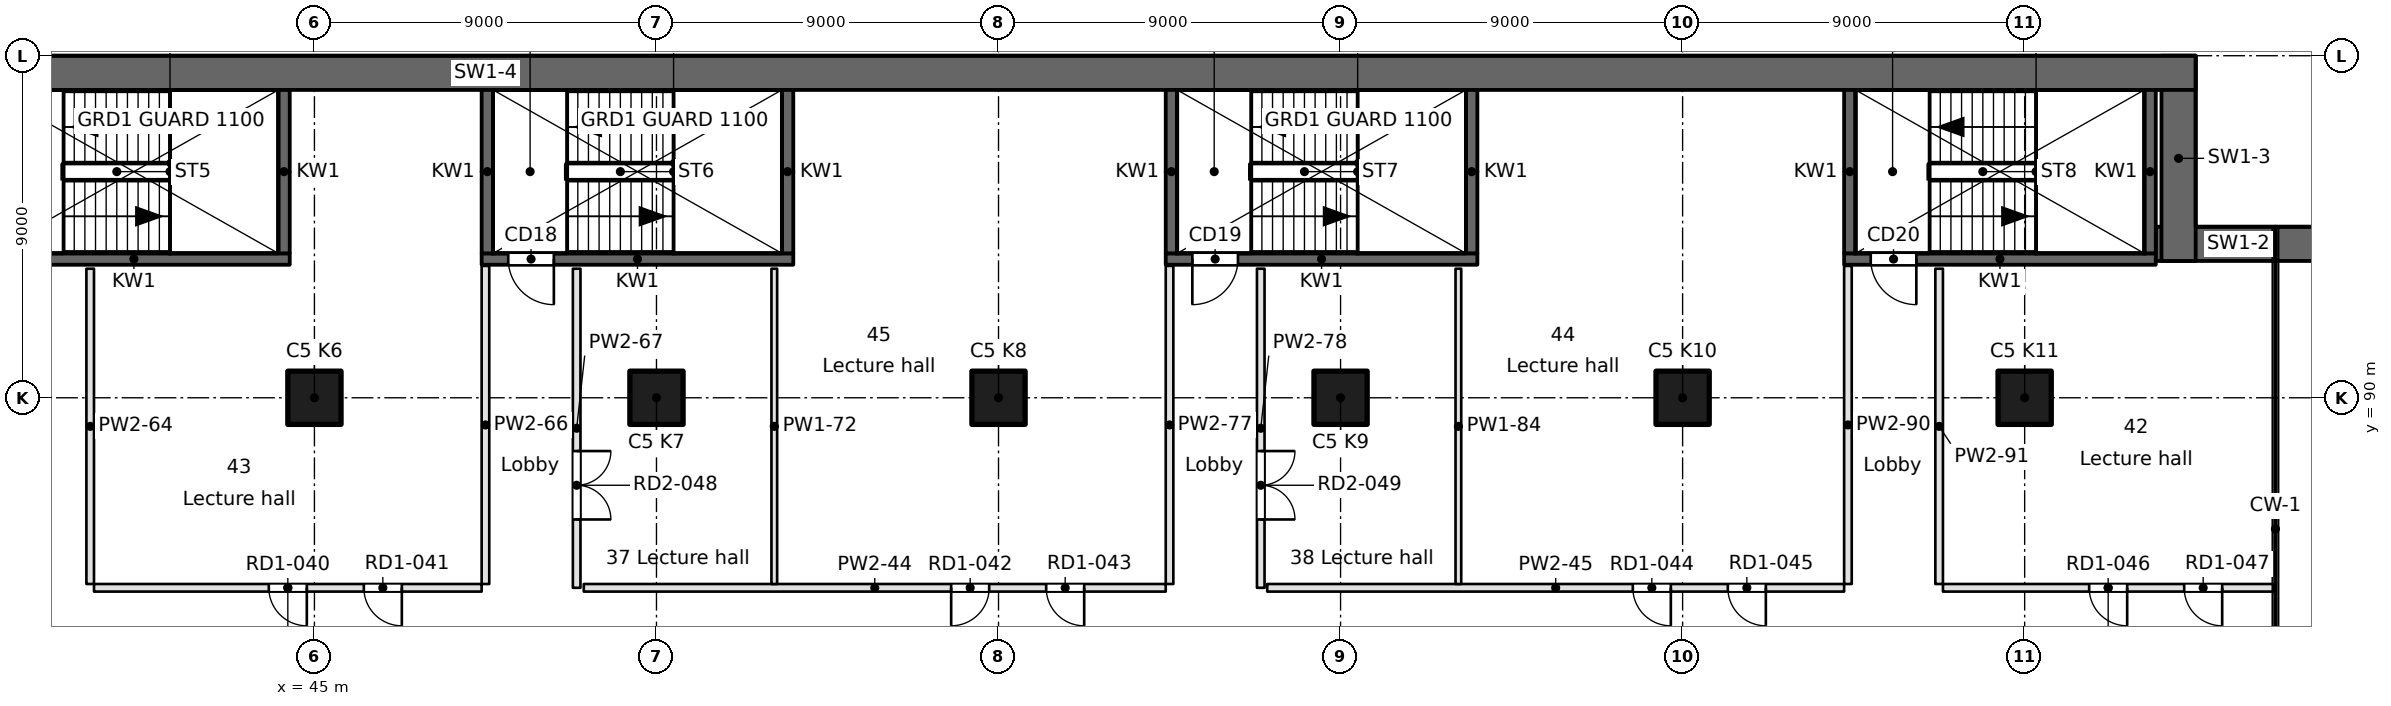
"""IFC4 building model, lengths in metres.
Left out: names, types, materials, properties, quantities, classifications, styles, units other than length and angle.
Written with IfcOpenShell. Run it as: python <this file> out.ifc"""

import sys

from ifc_helpers import new_model, si_unit, direction, frame, frame_2d, origin, origin_2d, place, context, subcontext, project, spatial, rectangle, extrude, element, fill, save


model = new_model("IFC4")
c1 = context("Model", 3, precision=1e-05, world=origin(), true_north=direction((0.0, 1.0)))
c2 = subcontext(c1, "Body", "Model", "MODEL_VIEW")
j1 = project(units=[si_unit("LENGTHUNIT", "METRE"), si_unit("PLANEANGLEUNIT", "RADIAN")], contexts=[c1])
p1 = place(None, origin())
s1 = spatial("IfcSite", under=j1, at=p1, CompositionType="ELEMENT")
p2 = place(p1, origin())
s2 = spatial("IfcBuilding", under=s1, at=p2, CompositionType="ELEMENT")
p3 = place(p2, frame((0.0, 0.0, 58.0)))
s3 = spatial("IfcBuildingStorey", under=s2, at=p3, CompositionType="ELEMENT", Elevation=58.0)
for number, where, z_axis, x_axis in (
    (1, (45.0, 90.0, 0.0), (0.0, 0.0, 1.0), (1.0, 0.0, 0.0)),
    (2, (54.0, 90.0, 0.0), (0.0, 0.0, 1.0), (1.0, 0.0, 0.0)),
    (3, (63.0, 90.0, 0.0), (0.0, 0.0, 1.0), (1.0, 0.0, 0.0)),
    (4, (72.0, 90.0, 0.0), (0.0, 0.0, 1.0), (1.0, 0.0, 0.0)),
    (5, (81.0, 90.0, 0.0), (0.0, 0.0, 1.0), (1.0, 0.0, 0.0)),
    (6, (90.0, 90.0, 0.0), (0.0, 0.0, 1.0), (1.0, 0.0, 0.0)),
):
    element("IfcColumn", number, at=place(p3, frame(where, z_axis=z_axis, x_axis=x_axis)), inside=s3, PredefinedType="COLUMN", context=c2, shape_type="SweptSolid", body=[
        extrude(rectangle(XDim=1.4, YDim=1.4, at=origin_2d()), origin(), (0.0, 0.0, 1.0), 3.7),
    ])
p4 = place(p3, frame((97.8, 94.05, 0.0), z_axis=(0.0, 0.0, 1.0), x_axis=(-1.0, 0.0, 0.0)))
e7 = element("IfcWall", 7, at=p4, inside=s3, PredefinedType="SHEAR", context=c2, shape_type="SweptSolid", body=[
    extrude(rectangle(XDim=4.351, YDim=0.9, at=frame_2d((2.175, 0.0))), origin(), (0.0, 0.0, 1.0), 3.7),
])
p5 = place(p3, frame((94.05, 93.6, 0.0), z_axis=(0.0, 0.0, 1.0), x_axis=(0.0, 1.0, 0.0)))
e8 = element("IfcWall", 8, at=p5, inside=s3, PredefinedType="SHEAR", context=c2, shape_type="SweptSolid", body=[
    extrude(rectangle(XDim=5.4, YDim=0.9, at=frame_2d((2.7, 0.0))), origin(), (0.0, 0.0, 1.0), 3.7),
])
p6 = place(p3, frame((94.5, 98.55, 0.0), z_axis=(0.0, 0.0, 1.0), x_axis=(-1.0, 0.0, 0.0)))
e9 = element("IfcWall", 9, at=p6, inside=s3, PredefinedType="SHEAR", context=c2, shape_type="SweptSolid", body=[
    extrude(rectangle(XDim=90.0, YDim=0.9, at=frame_2d((45.0, 0.0))), origin(), (0.0, 0.0, 1.0), 3.7),
])
p7 = place(p3, frame((36.15, 93.65, -0.4), z_axis=(0.0, 0.0, 1.0), x_axis=(1.0, 0.0, 0.0)))
e10 = element("IfcWall", 10, at=p7, inside=s3, PredefinedType="SOLIDWALL", context=c2, shape_type="SweptSolid", body=[
    extrude(rectangle(XDim=8.2, YDim=0.3, at=frame_2d((4.1, 0.0))), origin(), (0.0, 0.0, 1.0), 3.7),
])
p8 = place(p7, frame((0.7, 0.0, 0.4)))
e11 = element("IfcOpeningElement", 11, at=p8, cuts=e10, PredefinedType="OPENING", context=c2, shape_type="SweptSolid", body=[
    extrude(rectangle(XDim=1.2, YDim=2.1, at=frame_2d((0.6, 1.05))), frame((0.0, 0.15, 0.0), z_axis=(0.0, -1.0, 0.0), x_axis=(1.0, 0.0, 0.0)), (0.0, 0.0, 1.0), 0.3),
])
p9 = place(p3, frame((49.4, 93.65, -0.4), z_axis=(0.0, 0.0, 1.0), x_axis=(1.0, 0.0, 0.0)))
e12 = element("IfcWall", 12, at=p9, inside=s3, PredefinedType="SOLIDWALL", context=c2, shape_type="SweptSolid", body=[
    extrude(rectangle(XDim=8.2, YDim=0.3, at=frame_2d((4.1, 0.0))), origin(), (0.0, 0.0, 1.0), 3.7),
])
p10 = place(p9, frame((0.7, 0.0, 0.4)))
e13 = element("IfcOpeningElement", 13, at=p10, cuts=e12, PredefinedType="OPENING", context=c2, shape_type="SweptSolid", body=[
    extrude(rectangle(XDim=1.2, YDim=2.1, at=frame_2d((0.6, 1.05))), frame((0.0, 0.15, 0.0), z_axis=(0.0, -1.0, 0.0), x_axis=(1.0, 0.0, 0.0)), (0.0, 0.0, 1.0), 0.3),
])
p11 = place(p3, frame((67.4, 93.65, -0.4), z_axis=(0.0, 0.0, 1.0), x_axis=(1.0, 0.0, 0.0)))
e14 = element("IfcWall", 14, at=p11, inside=s3, PredefinedType="SOLIDWALL", context=c2, shape_type="SweptSolid", body=[
    extrude(rectangle(XDim=8.2, YDim=0.3, at=frame_2d((4.1, 0.0))), origin(), (0.0, 0.0, 1.0), 3.7),
])
p12 = place(p11, frame((0.7, 0.0, 0.4)))
e15 = element("IfcOpeningElement", 15, at=p12, cuts=e14, PredefinedType="OPENING", context=c2, shape_type="SweptSolid", body=[
    extrude(rectangle(XDim=1.2, YDim=2.1, at=frame_2d((0.6, 1.05))), frame((0.0, 0.15, 0.0), z_axis=(0.0, -1.0, 0.0), x_axis=(1.0, 0.0, 0.0)), (0.0, 0.0, 1.0), 0.3),
])
p13 = place(p3, frame((85.25, 93.65, -0.4), z_axis=(0.0, 0.0, 1.0), x_axis=(1.0, 0.0, 0.0)))
e16 = element("IfcWall", 16, at=p13, inside=s3, PredefinedType="SOLIDWALL", context=c2, shape_type="SweptSolid", body=[
    extrude(rectangle(XDim=8.2, YDim=0.3, at=frame_2d((4.1, 0.0))), origin(), (0.0, 0.0, 1.0), 3.7),
])
p14 = place(p13, frame((0.7, 0.0, 0.4)))
e17 = element("IfcOpeningElement", 17, at=p14, cuts=e16, PredefinedType="OPENING", context=c2, shape_type="SweptSolid", body=[
    extrude(rectangle(XDim=1.2, YDim=2.1, at=frame_2d((0.6, 1.05))), frame((0.0, 0.15, 0.0), z_axis=(0.0, -1.0, 0.0), x_axis=(1.0, 0.0, 0.0)), (0.0, 0.0, 1.0), 0.3),
])
for number, where, z_axis, x_axis in (
    (18, (44.2, 93.8, -0.4), (0.0, 0.0, 1.0), (0.0, 1.0, 0.0)),
    (19, (49.55, 93.8, -0.4), (0.0, 0.0, 1.0), (0.0, 1.0, 0.0)),
    (20, (57.45, 93.8, -0.4), (0.0, 0.0, 1.0), (0.0, 1.0, 0.0)),
    (21, (67.55, 93.8, -0.4), (0.0, 0.0, 1.0), (0.0, 1.0, 0.0)),
    (22, (75.45, 93.8, -0.4), (0.0, 0.0, 1.0), (0.0, 1.0, 0.0)),
    (23, (85.4, 93.8, -0.4), (0.0, 0.0, 1.0), (0.0, 1.0, 0.0)),
    (24, (93.3, 93.8, -0.4), (0.0, 0.0, 1.0), (0.0, 1.0, 0.0)),
):
    element("IfcWall", number, at=place(p3, frame(where, z_axis=z_axis, x_axis=x_axis)), inside=s3, PredefinedType="SOLIDWALL", context=c2, shape_type="SweptSolid", body=[
        extrude(rectangle(XDim=4.3, YDim=0.3, at=frame_2d((2.15, 0.0))), origin(), (0.0, 0.0, 1.0), 3.7),
    ])
p15 = place(p3, frame((39.2, 85.0, 0.0), z_axis=(0.0, 0.0, 1.0), x_axis=(1.0, 0.0, 0.0)))
e25 = element("IfcWall", 25, at=p15, inside=s3, PredefinedType="PARTITIONING", context=c2, shape_type="SweptSolid", body=[
    extrude(rectangle(XDim=10.2, YDim=0.2, at=frame_2d((5.1, 0.0))), origin(), (0.0, 0.0, 1.0), 3.3),
])
p16 = place(p15, frame((4.6, 0.0, 0.0)))
e26 = element("IfcOpeningElement", 26, at=p16, cuts=e25, PredefinedType="OPENING", context=c2, shape_type="SweptSolid", body=[
    extrude(rectangle(XDim=1.0, YDim=2.1, at=frame_2d((0.5, 1.05))), frame((0.0, 0.1, 0.0), z_axis=(0.0, -1.0, 0.0), x_axis=(1.0, 0.0, 0.0)), (0.0, 0.0, 1.0), 0.2),
])
p17 = place(p15, frame((7.1, 0.0, 0.0)))
e27 = element("IfcOpeningElement", 27, at=p17, cuts=e25, PredefinedType="OPENING", context=c2, shape_type="SweptSolid", body=[
    extrude(rectangle(XDim=1.0, YDim=2.1, at=frame_2d((0.5, 1.05))), frame((0.0, 0.1, 0.0), z_axis=(0.0, -1.0, 0.0), x_axis=(1.0, 0.0, 0.0)), (0.0, 0.0, 1.0), 0.2),
])
p18 = place(p3, frame((52.088, 85.0, 0.0), z_axis=(0.0, 0.0, 1.0), x_axis=(1.0, 0.0, 0.0)))
e28 = element("IfcWall", 28, at=p18, inside=s3, PredefinedType="PARTITIONING", context=c2, shape_type="SweptSolid", body=[
    extrude(rectangle(XDim=15.312, YDim=0.2, at=frame_2d((7.656, 0.0))), origin(), (0.0, 0.0, 1.0), 3.3),
])
p19 = place(p18, frame((9.667, 0.0, 0.0)))
e29 = element("IfcOpeningElement", 29, at=p19, cuts=e28, PredefinedType="OPENING", context=c2, shape_type="SweptSolid", body=[
    extrude(rectangle(XDim=1.0, YDim=2.1, at=frame_2d((0.5, 1.05))), frame((0.0, 0.1, 0.0), z_axis=(0.0, -1.0, 0.0), x_axis=(1.0, 0.0, 0.0)), (0.0, 0.0, 1.0), 0.2),
])
p20 = place(p18, frame((12.167, 0.0, 0.0)))
e30 = element("IfcOpeningElement", 30, at=p20, cuts=e28, PredefinedType="OPENING", context=c2, shape_type="SweptSolid", body=[
    extrude(rectangle(XDim=1.0, YDim=2.1, at=frame_2d((0.5, 1.05))), frame((0.0, 0.1, 0.0), z_axis=(0.0, -1.0, 0.0), x_axis=(1.0, 0.0, 0.0)), (0.0, 0.0, 1.0), 0.2),
])
p21 = place(p3, frame((70.07, 85.0, 0.0), z_axis=(0.0, 0.0, 1.0), x_axis=(1.0, 0.0, 0.0)))
e31 = element("IfcWall", 31, at=p21, inside=s3, PredefinedType="PARTITIONING", context=c2, shape_type="SweptSolid", body=[
    extrude(rectangle(XDim=15.18, YDim=0.2, at=frame_2d((7.59, 0.0))), origin(), (0.0, 0.0, 1.0), 3.3),
])
p22 = place(p21, frame((9.62, 0.0, 0.0)))
e32 = element("IfcOpeningElement", 32, at=p22, cuts=e31, PredefinedType="OPENING", context=c2, shape_type="SweptSolid", body=[
    extrude(rectangle(XDim=1.0, YDim=2.1, at=frame_2d((0.5, 1.05))), frame((0.0, 0.1, 0.0), z_axis=(0.0, -1.0, 0.0), x_axis=(1.0, 0.0, 0.0)), (0.0, 0.0, 1.0), 0.2),
])
p23 = place(p21, frame((12.12, 0.0, 0.0)))
e33 = element("IfcOpeningElement", 33, at=p23, cuts=e31, PredefinedType="OPENING", context=c2, shape_type="SweptSolid", body=[
    extrude(rectangle(XDim=1.0, YDim=2.1, at=frame_2d((0.5, 1.05))), frame((0.0, 0.1, 0.0), z_axis=(0.0, -1.0, 0.0), x_axis=(1.0, 0.0, 0.0)), (0.0, 0.0, 1.0), 0.2),
])
p24 = place(p3, frame((87.85, 85.0, 0.0), z_axis=(0.0, 0.0, 1.0), x_axis=(1.0, 0.0, 0.0)))
e34 = element("IfcWall", 34, at=p24, inside=s3, PredefinedType="PARTITIONING", context=c2, shape_type="SweptSolid", body=[
    extrude(rectangle(XDim=8.695, YDim=0.2, at=frame_2d((4.347, 0.0))), origin(), (0.0, 0.0, 1.0), 3.3),
])
p25 = place(p24, frame((3.847, 0.0, 0.0)))
e35 = element("IfcOpeningElement", 35, at=p25, cuts=e34, PredefinedType="OPENING", context=c2, shape_type="SweptSolid", body=[
    extrude(rectangle(XDim=1.0, YDim=2.1, at=frame_2d((0.5, 1.05))), frame((0.0, 0.1, 0.0), z_axis=(0.0, -1.0, 0.0), x_axis=(1.0, 0.0, 0.0)), (0.0, 0.0, 1.0), 0.2),
])
p26 = place(p24, frame((6.347, 0.0, 0.0)))
e36 = element("IfcOpeningElement", 36, at=p26, cuts=e34, PredefinedType="OPENING", context=c2, shape_type="SweptSolid", body=[
    extrude(rectangle(XDim=1.0, YDim=2.1, at=frame_2d((0.5, 1.05))), frame((0.0, 0.1, 0.0), z_axis=(0.0, -1.0, 0.0), x_axis=(1.0, 0.0, 0.0)), (0.0, 0.0, 1.0), 0.2),
])
p27 = place(p3, frame((39.1, 93.396, 0.0), z_axis=(0.0, 0.0, 1.0), x_axis=(0.0, -1.0, 0.0)))
e37 = element("IfcWall", 37, at=p27, inside=s3, PredefinedType="PARTITIONING", context=c2, shape_type="SweptSolid", body=[
    extrude(rectangle(XDim=8.296, YDim=0.2, at=frame_2d((4.148, 0.0))), origin(), (0.0, 0.0, 1.0), 3.3),
])
p28 = place(p3, frame((49.5, 85.1, 0.0), z_axis=(0.0, 0.0, 1.0), x_axis=(0.0, 1.0, 0.0)))
e38 = element("IfcWall", 38, at=p28, inside=s3, PredefinedType="PARTITIONING", context=c2, shape_type="SweptSolid", body=[
    extrude(rectangle(XDim=8.37, YDim=0.2, at=frame_2d((4.185, 0.0))), origin(), (0.0, 0.0, 1.0), 3.3),
])
p29 = place(p3, frame((51.9, 93.396, 0.0), z_axis=(0.0, 0.0, 1.0), x_axis=(0.0, -1.0, 0.0)))
e39 = element("IfcWall", 39, at=p29, inside=s3, PredefinedType="PARTITIONING", context=c2, shape_type="SweptSolid", body=[
    extrude(rectangle(XDim=8.396, YDim=0.2, at=frame_2d((4.198, 0.0))), origin(), (0.0, 0.0, 1.0), 3.3),
])
p30 = place(p29, frame((4.798, 0.0, 0.0)))
e40 = element("IfcOpeningElement", 40, at=p30, cuts=e39, PredefinedType="OPENING", context=c2, shape_type="SweptSolid", body=[
    extrude(rectangle(XDim=1.8, YDim=2.1, at=frame_2d((0.9, 1.05))), frame((0.0, 0.1, 0.0), z_axis=(0.0, -1.0, 0.0), x_axis=(1.0, 0.0, 0.0)), (0.0, 0.0, 1.0), 0.2),
])
p31 = place(p3, frame((57.1, 93.396, 0.0), z_axis=(0.0, 0.0, 1.0), x_axis=(0.0, -1.0, 0.0)))
e41 = element("IfcWall", 41, at=p31, inside=s3, PredefinedType="PARTITIONING", context=c2, shape_type="SweptSolid", body=[
    extrude(rectangle(XDim=8.296, YDim=0.15, at=frame_2d((4.148, 0.0))), origin(), (0.0, 0.0, 1.0), 3.3),
])
p32 = place(p3, frame((67.5, 85.1, 0.0), z_axis=(0.0, 0.0, 1.0), x_axis=(0.0, 1.0, 0.0)))
e42 = element("IfcWall", 42, at=p32, inside=s3, PredefinedType="PARTITIONING", context=c2, shape_type="SweptSolid", body=[
    extrude(rectangle(XDim=8.37, YDim=0.2, at=frame_2d((4.185, 0.0))), origin(), (0.0, 0.0, 1.0), 3.3),
])
p33 = place(p3, frame((69.9, 93.396, 0.0), z_axis=(0.0, 0.0, 1.0), x_axis=(0.0, -1.0, 0.0)))
e43 = element("IfcWall", 43, at=p33, inside=s3, PredefinedType="PARTITIONING", context=c2, shape_type="SweptSolid", body=[
    extrude(rectangle(XDim=8.396, YDim=0.2, at=frame_2d((4.198, 0.0))), origin(), (0.0, 0.0, 1.0), 3.3),
])
p34 = place(p33, frame((4.798, 0.0, 0.0)))
e44 = element("IfcOpeningElement", 44, at=p34, cuts=e43, PredefinedType="OPENING", context=c2, shape_type="SweptSolid", body=[
    extrude(rectangle(XDim=1.8, YDim=2.1, at=frame_2d((0.9, 1.05))), frame((0.0, 0.1, 0.0), z_axis=(0.0, -1.0, 0.0), x_axis=(1.0, 0.0, 0.0)), (0.0, 0.0, 1.0), 0.2),
])
p35 = place(p3, frame((75.1, 93.396, 0.0), z_axis=(0.0, 0.0, 1.0), x_axis=(0.0, -1.0, 0.0)))
e45 = element("IfcWall", 45, at=p35, inside=s3, PredefinedType="PARTITIONING", context=c2, shape_type="SweptSolid", body=[
    extrude(rectangle(XDim=8.296, YDim=0.15, at=frame_2d((4.148, 0.0))), origin(), (0.0, 0.0, 1.0), 3.3),
])
p36 = place(p3, frame((85.35, 85.1, 0.0), z_axis=(0.0, 0.0, 1.0), x_axis=(0.0, 1.0, 0.0)))
e46 = element("IfcWall", 46, at=p36, inside=s3, PredefinedType="PARTITIONING", context=c2, shape_type="SweptSolid", body=[
    extrude(rectangle(XDim=8.37, YDim=0.2, at=frame_2d((4.185, 0.0))), origin(), (0.0, 0.0, 1.0), 3.3),
])
p37 = place(p3, frame((87.75, 93.396, 0.0), z_axis=(0.0, 0.0, 1.0), x_axis=(0.0, -1.0, 0.0)))
e47 = element("IfcWall", 47, at=p37, inside=s3, PredefinedType="PARTITIONING", context=c2, shape_type="SweptSolid", body=[
    extrude(rectangle(XDim=8.296, YDim=0.2, at=frame_2d((4.148, 0.0))), origin(), (0.0, 0.0, 1.0), 3.3),
])
p38 = place(p10, frame((1.2, 0.0, 0.0), z_axis=(0.0, 0.0, 1.0), x_axis=(-1.0, 0.0, 0.0)))
e48 = element("IfcDoor", 48, at=p38, inside=s3, OperationType="SINGLE_SWING_LEFT", PredefinedType="DOOR", context=c2, shape_type="SweptSolid", body=[
    extrude(rectangle(XDim=1.2, YDim=2.1, at=frame_2d((0.6, 1.05))), frame((0.0, 0.025, 0.0), z_axis=(0.0, -1.0, 0.0), x_axis=(1.0, 0.0, 0.0)), (0.0, 0.0, 1.0), 0.05),
])
fill(e13, e48)
p39 = place(p12, frame((1.2, 0.0, 0.0), z_axis=(0.0, 0.0, 1.0), x_axis=(-1.0, 0.0, 0.0)))
e49 = element("IfcDoor", 49, at=p39, inside=s3, OperationType="SINGLE_SWING_RIGHT", PredefinedType="DOOR", context=c2, shape_type="SweptSolid", body=[
    extrude(rectangle(XDim=1.2, YDim=2.1, at=frame_2d((0.6, 1.05))), frame((0.0, 0.025, 0.0), z_axis=(0.0, -1.0, 0.0), x_axis=(1.0, 0.0, 0.0)), (0.0, 0.0, 1.0), 0.05),
])
fill(e15, e49)
p40 = place(p14, frame((1.2, 0.0, 0.0), z_axis=(0.0, 0.0, 1.0), x_axis=(-1.0, 0.0, 0.0)))
e50 = element("IfcDoor", 50, at=p40, inside=s3, OperationType="SINGLE_SWING_LEFT", PredefinedType="DOOR", context=c2, shape_type="SweptSolid", body=[
    extrude(rectangle(XDim=1.2, YDim=2.1, at=frame_2d((0.6, 1.05))), frame((0.0, 0.025, 0.0), z_axis=(0.0, -1.0, 0.0), x_axis=(1.0, 0.0, 0.0)), (0.0, 0.0, 1.0), 0.05),
])
fill(e17, e50)
p41 = place(p16, frame((1.0, 0.0, 0.0), z_axis=(0.0, 0.0, 1.0), x_axis=(-1.0, 0.0, 0.0)))
e51 = element("IfcDoor", 51, at=p41, inside=s3, OperationType="SINGLE_SWING_LEFT", PredefinedType="DOOR", context=c2, shape_type="SweptSolid", body=[
    extrude(rectangle(XDim=1.0, YDim=2.1, at=frame_2d((0.5, 1.05))), frame((0.0, 0.025, 0.0), z_axis=(0.0, -1.0, 0.0), x_axis=(1.0, 0.0, 0.0)), (0.0, 0.0, 1.0), 0.05),
])
fill(e26, e51)
p42 = place(p17, frame((1.0, 0.0, 0.0), z_axis=(0.0, 0.0, 1.0), x_axis=(-1.0, 0.0, 0.0)))
e52 = element("IfcDoor", 52, at=p42, inside=s3, OperationType="SINGLE_SWING_LEFT", PredefinedType="DOOR", context=c2, shape_type="SweptSolid", body=[
    extrude(rectangle(XDim=1.0, YDim=2.1, at=frame_2d((0.5, 1.05))), frame((0.0, 0.025, 0.0), z_axis=(0.0, -1.0, 0.0), x_axis=(1.0, 0.0, 0.0)), (0.0, 0.0, 1.0), 0.05),
])
fill(e27, e52)
p43 = place(p19, frame((1.0, 0.0, 0.0), z_axis=(0.0, 0.0, 1.0), x_axis=(-1.0, 0.0, 0.0)))
e53 = element("IfcDoor", 53, at=p43, inside=s3, OperationType="SINGLE_SWING_RIGHT", PredefinedType="DOOR", context=c2, shape_type="SweptSolid", body=[
    extrude(rectangle(XDim=1.0, YDim=2.1, at=frame_2d((0.5, 1.05))), frame((0.0, 0.025, 0.0), z_axis=(0.0, -1.0, 0.0), x_axis=(1.0, 0.0, 0.0)), (0.0, 0.0, 1.0), 0.05),
])
fill(e29, e53)
p44 = place(p20, frame((1.0, 0.0, 0.0), z_axis=(0.0, 0.0, 1.0), x_axis=(-1.0, 0.0, 0.0)))
e54 = element("IfcDoor", 54, at=p44, inside=s3, OperationType="SINGLE_SWING_LEFT", PredefinedType="DOOR", context=c2, shape_type="SweptSolid", body=[
    extrude(rectangle(XDim=1.0, YDim=2.1, at=frame_2d((0.5, 1.05))), frame((0.0, 0.025, 0.0), z_axis=(0.0, -1.0, 0.0), x_axis=(1.0, 0.0, 0.0)), (0.0, 0.0, 1.0), 0.05),
])
fill(e30, e54)
p45 = place(p22, frame((1.0, 0.0, 0.0), z_axis=(0.0, 0.0, 1.0), x_axis=(-1.0, 0.0, 0.0)))
e55 = element("IfcDoor", 55, at=p45, inside=s3, OperationType="SINGLE_SWING_LEFT", PredefinedType="DOOR", context=c2, shape_type="SweptSolid", body=[
    extrude(rectangle(XDim=1.0, YDim=2.1, at=frame_2d((0.5, 1.05))), frame((0.0, 0.025, 0.0), z_axis=(0.0, -1.0, 0.0), x_axis=(1.0, 0.0, 0.0)), (0.0, 0.0, 1.0), 0.05),
])
fill(e32, e55)
p46 = place(p23, frame((1.0, 0.0, 0.0), z_axis=(0.0, 0.0, 1.0), x_axis=(-1.0, 0.0, 0.0)))
e56 = element("IfcDoor", 56, at=p46, inside=s3, OperationType="SINGLE_SWING_LEFT", PredefinedType="DOOR", context=c2, shape_type="SweptSolid", body=[
    extrude(rectangle(XDim=1.0, YDim=2.1, at=frame_2d((0.5, 1.05))), frame((0.0, 0.025, 0.0), z_axis=(0.0, -1.0, 0.0), x_axis=(1.0, 0.0, 0.0)), (0.0, 0.0, 1.0), 0.05),
])
fill(e33, e56)
p47 = place(p25, frame((1.0, 0.0, 0.0), z_axis=(0.0, 0.0, 1.0), x_axis=(-1.0, 0.0, 0.0)))
e57 = element("IfcDoor", 57, at=p47, inside=s3, OperationType="SINGLE_SWING_LEFT", PredefinedType="DOOR", context=c2, shape_type="SweptSolid", body=[
    extrude(rectangle(XDim=1.0, YDim=2.1, at=frame_2d((0.5, 1.05))), frame((0.0, 0.025, 0.0), z_axis=(0.0, -1.0, 0.0), x_axis=(1.0, 0.0, 0.0)), (0.0, 0.0, 1.0), 0.05),
])
fill(e35, e57)
p48 = place(p26, frame((1.0, 0.0, 0.0), z_axis=(0.0, 0.0, 1.0), x_axis=(-1.0, 0.0, 0.0)))
e58 = element("IfcDoor", 58, at=p48, inside=s3, OperationType="SINGLE_SWING_LEFT", PredefinedType="DOOR", context=c2, shape_type="SweptSolid", body=[
    extrude(rectangle(XDim=1.0, YDim=2.1, at=frame_2d((0.5, 1.05))), frame((0.0, 0.025, 0.0), z_axis=(0.0, -1.0, 0.0), x_axis=(1.0, 0.0, 0.0)), (0.0, 0.0, 1.0), 0.05),
])
fill(e36, e58)
p49 = place(p30, origin())
e59 = element("IfcDoor", 59, at=p49, inside=s3, OperationType="DOUBLE_DOOR_SINGLE_SWING", PredefinedType="DOOR", context=c2, shape_type="SweptSolid", body=[
    extrude(rectangle(XDim=1.8, YDim=2.1, at=frame_2d((0.9, 1.05))), frame((0.0, 0.025, 0.0), z_axis=(0.0, -1.0, 0.0), x_axis=(1.0, 0.0, 0.0)), (0.0, 0.0, 1.0), 0.05),
])
fill(e40, e59)
p50 = place(p34, origin())
e60 = element("IfcDoor", 60, at=p50, inside=s3, OperationType="DOUBLE_DOOR_SINGLE_SWING", PredefinedType="DOOR", context=c2, shape_type="SweptSolid", body=[
    extrude(rectangle(XDim=1.8, YDim=2.1, at=frame_2d((0.9, 1.05))), frame((0.0, 0.025, 0.0), z_axis=(0.0, -1.0, 0.0), x_axis=(1.0, 0.0, 0.0)), (0.0, 0.0, 1.0), 0.05),
])
fill(e44, e60)
save(model, sys.argv[1])
